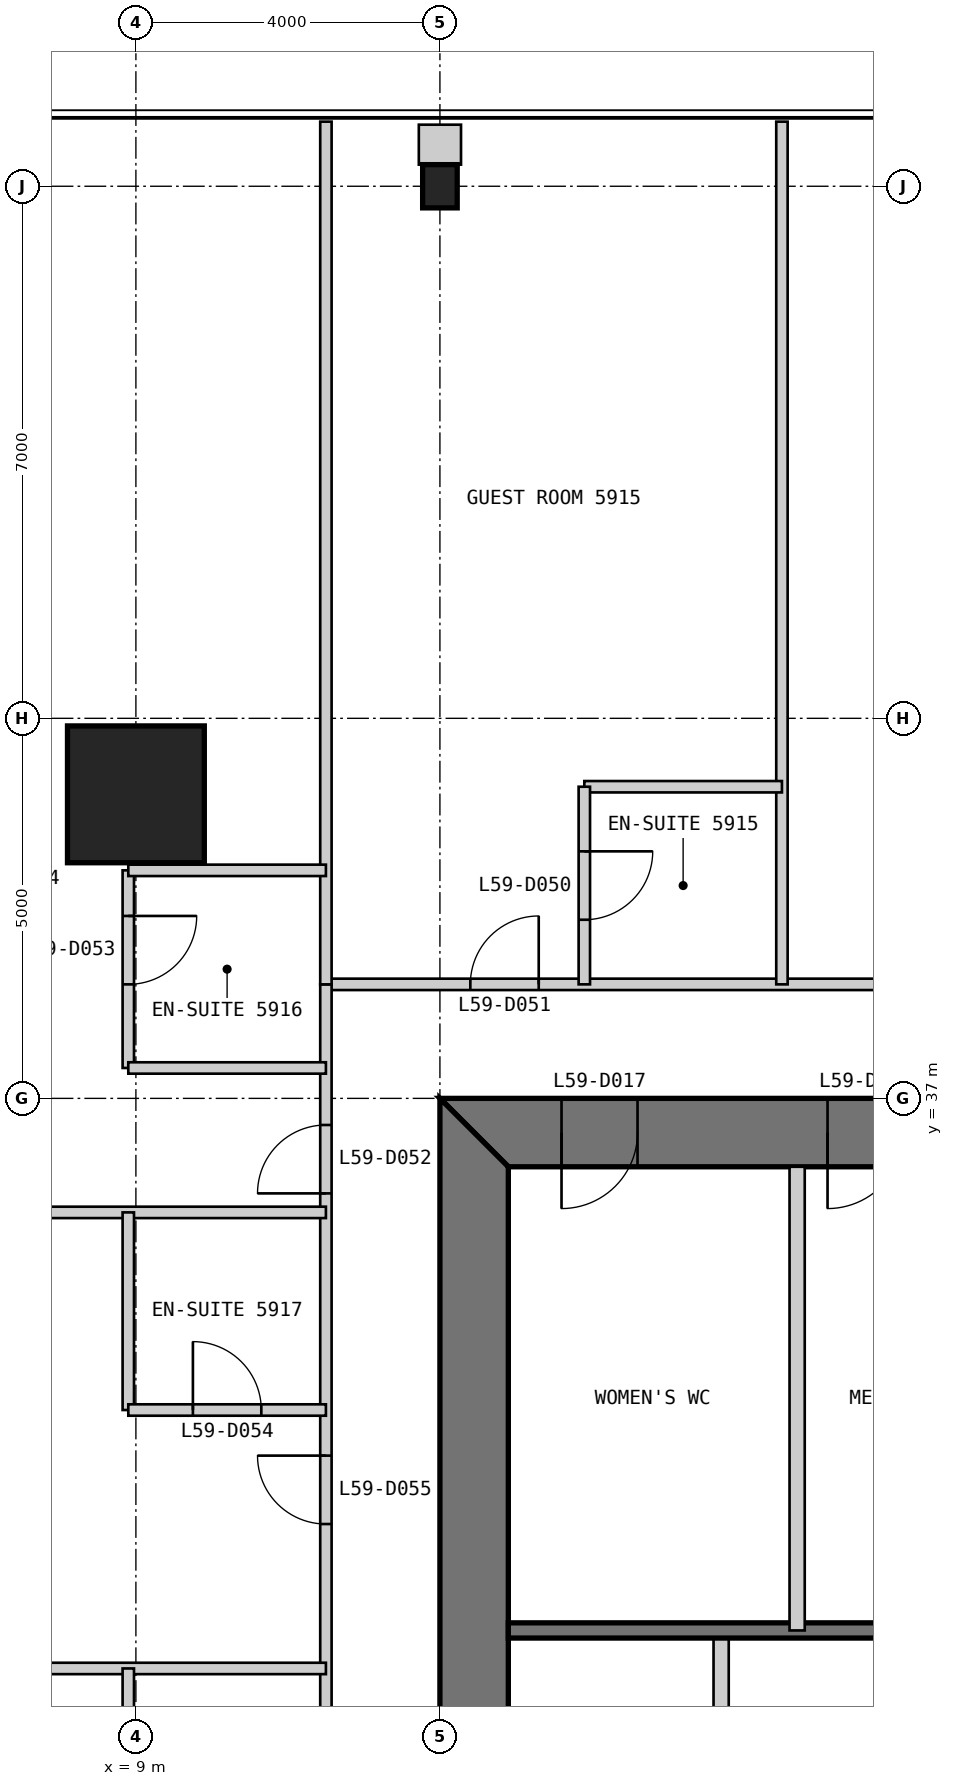
"""IFC4 building model, lengths in metres.
Left out: names, types, materials, properties, quantities, classifications, styles, units other than length and angle.
Written with IfcOpenShell. Run it as: python <this file> out.ifc"""

import sys

from ifc_helpers import new_model, si_unit, direction, frame, frame_2d, origin, origin_2d, place, context, subcontext, project, spatial, polyline, rectangle, i_section, outline, extrude, element, fill, save


model = new_model("IFC4")
c1 = context("Model", 3, precision=1e-05, world=origin(), true_north=direction((0.0, 1.0)))
c2 = subcontext(c1, "Body", "Model", "MODEL_VIEW")
j1 = project(units=[si_unit("LENGTHUNIT", "METRE"), si_unit("PLANEANGLEUNIT", "RADIAN")], contexts=[c1])
p1 = place(None, origin())
s1 = spatial("IfcSite", under=j1, at=p1, CompositionType="ELEMENT")
p2 = place(p1, origin())
s2 = spatial("IfcBuilding", under=s1, at=p2, CompositionType="ELEMENT")
p3 = place(p2, frame((0.0, 0.0, 252.6)))
s3 = spatial("IfcBuildingStorey", under=s2, at=p3, CompositionType="ELEMENT", Elevation=252.6)
p4 = place(p3, frame((9.0, 41.0, 0.0), z_axis=(0.0, 0.0, 1.0), x_axis=(1.0, 0.0, 0.0)))
e1 = element("IfcColumn", 1, at=p4, inside=s3, PredefinedType="COLUMN", context=c2, shape_type="SweptSolid", body=[
    extrude(rectangle(XDim=1.8, YDim=1.8, at=origin_2d()), origin(), (0.0, 0.0, 1.0), 3.4),
])
p5 = place(p3, frame((13.0, 49.0, 0.0), z_axis=(0.0, 0.0, 1.0), x_axis=(1.0, 0.0, 0.0)))
e2 = element("IfcColumn", 2, at=p5, inside=s3, PredefinedType="COLUMN", context=c2, shape_type="SweptSolid", body=[
    extrude(i_section(OverallWidth=0.455, OverallDepth=0.569, WebThickness=0.078, FlangeThickness=0.125, at=origin_2d()), origin(), (0.0, 0.0, 1.0), 3.4),
])
p6 = place(p3, frame((37.0, 36.55, 0.0), z_axis=(0.0, 0.0, 1.0), x_axis=(-1.0, 0.0, 0.0)))
e3 = element("IfcWall", 3, at=p6, inside=s3, PredefinedType="SHEAR", context=c2, shape_type="SweptSolid", body=[
    extrude(outline(polyline([(0.0, -0.45), (24.0, -0.45), (23.1, 0.45), (0.9, 0.45), (0.0, -0.45)])), origin(), (0.0, 0.0, 1.0), 3.4),
])
p7 = place(p6, frame((4.9, 0.0, 0.0)))
e4 = element("IfcOpeningElement", 4, at=p7, cuts=e3, PredefinedType="OPENING", context=c2, shape_type="SweptSolid", body=[
    extrude(rectangle(XDim=1.0, YDim=2.2, at=frame_2d((0.5, 1.1))), frame((0.0, 0.46, 0.0), z_axis=(0.0, -1.0, 0.0), x_axis=(1.0, 0.0, 0.0)), (0.0, 0.0, 1.0), 0.92),
])
p8 = place(p6, frame((8.9, 0.0, 0.0)))
e5 = element("IfcOpeningElement", 5, at=p8, cuts=e3, PredefinedType="OPENING", context=c2, shape_type="SweptSolid", body=[
    extrude(rectangle(XDim=1.1, YDim=2.2, at=frame_2d((0.55, 1.1))), frame((0.0, 0.46, 0.0), z_axis=(0.0, -1.0, 0.0), x_axis=(1.0, 0.0, 0.0)), (0.0, 0.0, 1.0), 0.92),
])
p9 = place(p6, frame((15.05, 0.0, 0.0)))
e6 = element("IfcOpeningElement", 6, at=p9, cuts=e3, PredefinedType="OPENING", context=c2, shape_type="SweptSolid", body=[
    extrude(rectangle(XDim=0.9, YDim=2.2, at=frame_2d((0.45, 1.1))), frame((0.0, 0.46, 0.0), z_axis=(0.0, -1.0, 0.0), x_axis=(1.0, 0.0, 0.0)), (0.0, 0.0, 1.0), 0.92),
])
p10 = place(p6, frame((17.9, 0.0, 0.0)))
e7 = element("IfcOpeningElement", 7, at=p10, cuts=e3, PredefinedType="OPENING", context=c2, shape_type="SweptSolid", body=[
    extrude(rectangle(XDim=1.0, YDim=2.2, at=frame_2d((0.5, 1.1))), frame((0.0, 0.46, 0.0), z_axis=(0.0, -1.0, 0.0), x_axis=(1.0, 0.0, 0.0)), (0.0, 0.0, 1.0), 0.92),
])
p11 = place(p6, frame((21.4, 0.0, 0.0)))
e8 = element("IfcOpeningElement", 8, at=p11, cuts=e3, PredefinedType="OPENING", context=c2, shape_type="SweptSolid", body=[
    extrude(rectangle(XDim=1.0, YDim=2.2, at=frame_2d((0.5, 1.1))), frame((0.0, 0.46, 0.0), z_axis=(0.0, -1.0, 0.0), x_axis=(1.0, 0.0, 0.0)), (0.0, 0.0, 1.0), 0.92),
])
p12 = place(p3, frame((13.45, 36.1, 0.0), z_axis=(0.0, 0.0, 1.0), x_axis=(0.0, -1.0, 0.0)))
e9 = element("IfcWall", 9, at=p12, inside=s3, PredefinedType="SHEAR", context=c2, shape_type="SweptSolid", body=[
    extrude(outline(polyline([(-0.9, -0.45), (23.1, -0.45), (22.2, 0.45), (0.0, 0.45), (-0.9, -0.45)])), origin(), (0.0, 0.0, 1.0), 3.4),
])
p13 = place(p12, frame((20.2, 0.0, 0.0)))
e10 = element("IfcOpeningElement", 10, at=p13, cuts=e9, PredefinedType="OPENING", context=c2, shape_type="SweptSolid", body=[
    extrude(rectangle(XDim=1.0, YDim=2.2, at=frame_2d((0.5, 1.1))), frame((0.0, 0.46, 0.0), z_axis=(0.0, -1.0, 0.0), x_axis=(1.0, 0.0, 0.0)), (0.0, 0.0, 1.0), 0.92),
])
p14 = place(p12, frame((17.25, 0.0, 0.0)))
e11 = element("IfcOpeningElement", 11, at=p14, cuts=e9, PredefinedType="OPENING", context=c2, shape_type="SweptSolid", body=[
    extrude(rectangle(XDim=0.9, YDim=2.2, at=frame_2d((0.45, 1.1))), frame((0.0, 0.46, 0.0), z_axis=(0.0, -1.0, 0.0), x_axis=(1.0, 0.0, 0.0)), (0.0, 0.0, 1.0), 0.92),
])
p15 = place(p3, frame((16.7, 13.9, 0.0), z_axis=(0.0, 0.0, 1.0), x_axis=(0.0, 1.0, 0.0)))
e12 = element("IfcWall", 12, at=p15, inside=s3, PredefinedType="PARTITIONING", context=c2, shape_type="SweptSolid", body=[
    extrude(rectangle(XDim=16.1, YDim=0.2, at=frame_2d((8.05, 0.0))), origin(), (0.0, 0.0, 1.0), 3.2),
])
p16 = place(p15, frame((13.4, 0.0, 0.0)))
e13 = element("IfcOpeningElement", 13, at=p16, cuts=e12, PredefinedType="OPENING", context=c2, shape_type="SweptSolid", body=[
    extrude(rectangle(XDim=0.9, YDim=2.2, at=frame_2d((0.45, 1.1))), frame((0.0, 0.11, 0.0), z_axis=(0.0, -1.0, 0.0), x_axis=(1.0, 0.0, 0.0)), (0.0, 0.0, 1.0), 0.22),
])
p17 = place(p3, frame((29.7, 30.0, 0.0), z_axis=(0.0, 0.0, 1.0), x_axis=(-1.0, 0.0, 0.0)))
e14 = element("IfcWall", 14, at=p17, inside=s3, PredefinedType="SOLIDWALL", context=c2, shape_type="SweptSolid", body=[
    extrude(rectangle(XDim=15.8, YDim=0.2, at=frame_2d((7.9, 0.0))), origin(), (0.0, 0.0, 1.0), 3.2),
])
p18 = place(p3, frame((17.7, 36.1, 0.0), z_axis=(0.0, 0.0, 1.0), x_axis=(0.0, -1.0, 0.0)))
e15 = element("IfcWall", 15, at=p18, inside=s3, PredefinedType="PARTITIONING", context=c2, shape_type="SweptSolid", body=[
    extrude(rectangle(XDim=6.1, YDim=0.2, at=frame_2d((3.05, 0.0))), origin(), (0.0, 0.0, 1.0), 3.2),
])
p19 = place(p3, frame((38.5, 38.5, 0.0), z_axis=(0.0, 0.0, 1.0), x_axis=(-1.0, 0.0, 0.0)))
e16 = element("IfcWall", 16, at=p19, inside=s3, PredefinedType="PARTITIONING", context=c2, shape_type="SweptSolid", body=[
    extrude(rectangle(XDim=27.0, YDim=0.15, at=frame_2d((13.5, 0.0))), origin(), (0.0, 0.0, 1.0), 3.25),
])
p20 = place(p19, frame((1.85, 0.0, 0.0)))
e17 = element("IfcOpeningElement", 17, at=p20, cuts=e16, PredefinedType="OPENING", context=c2, shape_type="SweptSolid", body=[
    extrude(rectangle(XDim=0.9, YDim=2.1, at=frame_2d((0.45, 1.05))), frame((0.0, 0.085, 0.0), z_axis=(0.0, -1.0, 0.0), x_axis=(1.0, 0.0, 0.0)), (0.0, 0.0, 1.0), 0.17),
])
p21 = place(p19, frame((6.2, 0.0, 0.0)))
e18 = element("IfcOpeningElement", 18, at=p21, cuts=e16, PredefinedType="OPENING", context=c2, shape_type="SweptSolid", body=[
    extrude(rectangle(XDim=0.9, YDim=2.1, at=frame_2d((0.45, 1.05))), frame((0.0, 0.085, 0.0), z_axis=(0.0, -1.0, 0.0), x_axis=(1.0, 0.0, 0.0)), (0.0, 0.0, 1.0), 0.17),
])
p22 = place(p19, frame((12.8, 0.0, 0.0)))
e19 = element("IfcOpeningElement", 19, at=p22, cuts=e16, PredefinedType="OPENING", context=c2, shape_type="SweptSolid", body=[
    extrude(rectangle(XDim=1.0, YDim=2.1, at=frame_2d((0.5, 1.05))), frame((0.0, 0.085, 0.0), z_axis=(0.0, -1.0, 0.0), x_axis=(1.0, 0.0, 0.0)), (0.0, 0.0, 1.0), 0.17),
])
p23 = place(p19, frame((18.2, 0.0, 0.0)))
e20 = element("IfcOpeningElement", 20, at=p23, cuts=e16, PredefinedType="OPENING", context=c2, shape_type="SweptSolid", body=[
    extrude(rectangle(XDim=0.9, YDim=2.1, at=frame_2d((0.45, 1.05))), frame((0.0, 0.085, 0.0), z_axis=(0.0, -1.0, 0.0), x_axis=(1.0, 0.0, 0.0)), (0.0, 0.0, 1.0), 0.17),
])
p24 = place(p19, frame((24.2, 0.0, 0.0)))
e21 = element("IfcOpeningElement", 21, at=p24, cuts=e16, PredefinedType="OPENING", context=c2, shape_type="SweptSolid", body=[
    extrude(rectangle(XDim=0.9, YDim=2.1, at=frame_2d((0.45, 1.05))), frame((0.0, 0.085, 0.0), z_axis=(0.0, -1.0, 0.0), x_axis=(1.0, 0.0, 0.0)), (0.0, 0.0, 1.0), 0.17),
])
p25 = place(p3, frame((17.5, 49.85, 0.0), z_axis=(0.0, 0.0, 1.0), x_axis=(0.0, -1.0, 0.0)))
e22 = element("IfcWall", 22, at=p25, inside=s3, PredefinedType="PARTITIONING", context=c2, shape_type="SweptSolid", body=[
    extrude(rectangle(XDim=11.35, YDim=0.15, at=frame_2d((5.675, 0.0))), origin(), (0.0, 0.0, 1.0), 3.25),
])
p26 = place(p3, frame((17.5, 41.1, 0.0), z_axis=(0.0, 0.0, 1.0), x_axis=(-1.0, 0.0, 0.0)))
e23 = element("IfcWall", 23, at=p26, inside=s3, PredefinedType="PARTITIONING", context=c2, shape_type="SweptSolid", body=[
    extrude(rectangle(XDim=2.6, YDim=0.15, at=frame_2d((1.3, 0.0))), origin(), (0.0, 0.0, 1.0), 3.25),
])
p27 = place(p3, frame((14.9, 41.1, 0.0), z_axis=(0.0, 0.0, 1.0), x_axis=(0.0, -1.0, 0.0)))
e24 = element("IfcWall", 24, at=p27, inside=s3, PredefinedType="PARTITIONING", context=c2, shape_type="SweptSolid", body=[
    extrude(rectangle(XDim=2.6, YDim=0.15, at=frame_2d((1.3, 0.0))), origin(), (0.0, 0.0, 1.0), 3.25),
])
p28 = place(p27, frame((0.85, 0.0, 0.0)))
e25 = element("IfcOpeningElement", 25, at=p28, cuts=e24, PredefinedType="OPENING", context=c2, shape_type="SweptSolid", body=[
    extrude(rectangle(XDim=0.9, YDim=2.1, at=frame_2d((0.45, 1.05))), frame((0.0, 0.085, 0.0), z_axis=(0.0, -1.0, 0.0), x_axis=(1.0, 0.0, 0.0)), (0.0, 0.0, 1.0), 0.17),
])
p29 = place(p3, frame((11.5, 38.5, 0.0), z_axis=(0.0, 0.0, 1.0), x_axis=(0.0, -1.0, 0.0)))
e26 = element("IfcWall", 26, at=p29, inside=s3, PredefinedType="PARTITIONING", context=c2, shape_type="SweptSolid", body=[
    extrude(rectangle(XDim=27.0, YDim=0.15, at=frame_2d((13.5, 0.0))), origin(), (0.0, 0.0, 1.0), 3.25),
])
p30 = place(p29, frame((1.85, 0.0, 0.0)))
e27 = element("IfcOpeningElement", 27, at=p30, cuts=e26, PredefinedType="OPENING", context=c2, shape_type="SweptSolid", body=[
    extrude(rectangle(XDim=0.9, YDim=2.1, at=frame_2d((0.45, 1.05))), frame((0.0, 0.085, 0.0), z_axis=(0.0, -1.0, 0.0), x_axis=(1.0, 0.0, 0.0)), (0.0, 0.0, 1.0), 0.17),
])
p31 = place(p29, frame((6.2, 0.0, 0.0)))
e28 = element("IfcOpeningElement", 28, at=p31, cuts=e26, PredefinedType="OPENING", context=c2, shape_type="SweptSolid", body=[
    extrude(rectangle(XDim=0.9, YDim=2.1, at=frame_2d((0.45, 1.05))), frame((0.0, 0.085, 0.0), z_axis=(0.0, -1.0, 0.0), x_axis=(1.0, 0.0, 0.0)), (0.0, 0.0, 1.0), 0.17),
])
p32 = place(p29, frame((12.2, 0.0, 0.0)))
e29 = element("IfcOpeningElement", 29, at=p32, cuts=e26, PredefinedType="OPENING", context=c2, shape_type="SweptSolid", body=[
    extrude(rectangle(XDim=0.9, YDim=2.1, at=frame_2d((0.45, 1.05))), frame((0.0, 0.085, 0.0), z_axis=(0.0, -1.0, 0.0), x_axis=(1.0, 0.0, 0.0)), (0.0, 0.0, 1.0), 0.17),
])
p33 = place(p29, frame((18.2, 0.0, 0.0)))
e30 = element("IfcOpeningElement", 30, at=p33, cuts=e26, PredefinedType="OPENING", context=c2, shape_type="SweptSolid", body=[
    extrude(rectangle(XDim=0.9, YDim=2.1, at=frame_2d((0.45, 1.05))), frame((0.0, 0.085, 0.0), z_axis=(0.0, -1.0, 0.0), x_axis=(1.0, 0.0, 0.0)), (0.0, 0.0, 1.0), 0.17),
])
p34 = place(p29, frame((24.2, 0.0, 0.0)))
e31 = element("IfcOpeningElement", 31, at=p34, cuts=e26, PredefinedType="OPENING", context=c2, shape_type="SweptSolid", body=[
    extrude(rectangle(XDim=0.9, YDim=2.1, at=frame_2d((0.45, 1.05))), frame((0.0, 0.085, 0.0), z_axis=(0.0, -1.0, 0.0), x_axis=(1.0, 0.0, 0.0)), (0.0, 0.0, 1.0), 0.17),
])
p35 = place(p3, frame((11.5, 49.85, 0.0), z_axis=(0.0, 0.0, 1.0), x_axis=(0.0, -1.0, 0.0)))
e32 = element("IfcWall", 32, at=p35, inside=s3, PredefinedType="PARTITIONING", context=c2, shape_type="SweptSolid", body=[
    extrude(rectangle(XDim=11.35, YDim=0.15, at=frame_2d((5.675, 0.0))), origin(), (0.0, 0.0, 1.0), 3.25),
])
p36 = place(p3, frame((8.9, 40.0, 0.0), z_axis=(0.0, 0.0, 1.0), x_axis=(0.0, -1.0, 0.0)))
e33 = element("IfcWall", 33, at=p36, inside=s3, PredefinedType="PARTITIONING", context=c2, shape_type="SweptSolid", body=[
    extrude(rectangle(XDim=2.6, YDim=0.15, at=frame_2d((1.3, 0.0))), origin(), (0.0, 0.0, 1.0), 2.638),
])
p37 = place(p36, frame((0.6, 0.0, 0.0)))
e34 = element("IfcOpeningElement", 34, at=p37, cuts=e33, PredefinedType="OPENING", context=c2, shape_type="SweptSolid", body=[
    extrude(rectangle(XDim=0.9, YDim=2.1, at=frame_2d((0.45, 1.05))), frame((0.0, 0.085, 0.0), z_axis=(0.0, -1.0, 0.0), x_axis=(1.0, 0.0, 0.0)), (0.0, 0.0, 1.0), 0.17),
])
for number, where, z_axis, x_axis in (
    (35, (8.9, 40.0, 0.0), (0.0, 0.0, 1.0), (1.0, 0.0, 0.0)),
    (36, (8.9, 37.4, 0.0), (0.0, 0.0, 1.0), (1.0, 0.0, 0.0)),
):
    element("IfcWall", number, at=place(p3, frame(where, z_axis=z_axis, x_axis=x_axis)), inside=s3, PredefinedType="PARTITIONING", context=c2, shape_type="SweptSolid", body=[
        extrude(rectangle(XDim=2.6, YDim=0.15, at=frame_2d((1.3, 0.0))), origin(), (0.0, 0.0, 1.0), 3.25),
    ])
p38 = place(p3, frame((0.15, 35.5, 0.0), z_axis=(0.0, 0.0, 1.0), x_axis=(1.0, 0.0, 0.0)))
e37 = element("IfcWall", 37, at=p38, inside=s3, PredefinedType="PARTITIONING", context=c2, shape_type="SweptSolid", body=[
    extrude(rectangle(XDim=11.35, YDim=0.15, at=frame_2d((5.675, 0.0))), origin(), (0.0, 0.0, 1.0), 3.25),
])
p39 = place(p3, frame((8.9, 35.5, 0.0), z_axis=(0.0, 0.0, 1.0), x_axis=(0.0, -1.0, 0.0)))
e38 = element("IfcWall", 38, at=p39, inside=s3, PredefinedType="PARTITIONING", context=c2, shape_type="SweptSolid", body=[
    extrude(rectangle(XDim=2.6, YDim=0.15, at=frame_2d((1.3, 0.0))), origin(), (0.0, 0.0, 1.0), 3.25),
])
p40 = place(p3, frame((8.9, 32.9, 0.0), z_axis=(0.0, 0.0, 1.0), x_axis=(1.0, 0.0, 0.0)))
e39 = element("IfcWall", 39, at=p40, inside=s3, PredefinedType="PARTITIONING", context=c2, shape_type="SweptSolid", body=[
    extrude(rectangle(XDim=2.6, YDim=0.15, at=frame_2d((1.3, 0.0))), origin(), (0.0, 0.0, 1.0), 3.25),
])
p41 = place(p40, frame((0.85, 0.0, 0.0)))
e40 = element("IfcOpeningElement", 40, at=p41, cuts=e39, PredefinedType="OPENING", context=c2, shape_type="SweptSolid", body=[
    extrude(rectangle(XDim=0.9, YDim=2.1, at=frame_2d((0.45, 1.05))), frame((0.0, 0.085, 0.0), z_axis=(0.0, -1.0, 0.0), x_axis=(1.0, 0.0, 0.0)), (0.0, 0.0, 1.0), 0.17),
])
p42 = place(p3, frame((0.15, 29.5, 0.0), z_axis=(0.0, 0.0, 1.0), x_axis=(1.0, 0.0, 0.0)))
e41 = element("IfcWall", 41, at=p42, inside=s3, PredefinedType="PARTITIONING", context=c2, shape_type="SweptSolid", body=[
    extrude(rectangle(XDim=11.35, YDim=0.15, at=frame_2d((5.675, 0.0))), origin(), (0.0, 0.0, 1.0), 3.25),
])
p43 = place(p3, frame((8.9, 29.5, 0.0), z_axis=(0.0, 0.0, 1.0), x_axis=(0.0, -1.0, 0.0)))
e42 = element("IfcWall", 42, at=p43, inside=s3, PredefinedType="PARTITIONING", context=c2, shape_type="SweptSolid", body=[
    extrude(rectangle(XDim=2.6, YDim=0.15, at=frame_2d((1.3, 0.0))), origin(), (0.0, 0.0, 1.0), 3.25),
])
p44 = place(p3, frame((13.0, 49.81, 0.0), z_axis=(0.0, 0.0, 1.0), x_axis=(0.0, -1.0, 0.0)))
e43 = element("IfcWall", 43, at=p44, inside=s3, PredefinedType="PARTITIONING", context=c2, shape_type="SweptSolid", body=[
    extrude(rectangle(XDim=0.526, YDim=0.555, at=frame_2d((0.263, 0.0))), origin(), (0.0, 0.0, 1.0), 3.25),
])
p45 = place(p10, origin())
e44 = element("IfcDoor", 44, at=p45, inside=s3, OperationType="SINGLE_SWING_RIGHT", PredefinedType="DOOR", context=c2, shape_type="SweptSolid", body=[
    extrude(rectangle(XDim=1.0, YDim=2.2, at=frame_2d((0.5, 1.1))), frame((0.0, 0.025, 0.0), z_axis=(0.0, -1.0, 0.0), x_axis=(1.0, 0.0, 0.0)), (0.0, 0.0, 1.0), 0.05),
    extrude(outline(polyline([(0.0, 0.0), (0.04, 0.0), (0.04, 2.16), (0.96, 2.16), (0.96, 0.0), (1.0, 0.0), (1.0, 2.2), (0.0, 2.2), (0.0, 0.0)])), frame((0.0, 0.3, 0.0), z_axis=(0.0, -1.0, 0.0), x_axis=(1.0, 0.0, 0.0)), (0.0, 0.0, 1.0), 0.6),
])
fill(e7, e44)
p46 = place(p11, origin())
e45 = element("IfcDoor", 45, at=p46, inside=s3, OperationType="SINGLE_SWING_RIGHT", PredefinedType="DOOR", context=c2, shape_type="SweptSolid", body=[
    extrude(rectangle(XDim=1.0, YDim=2.2, at=frame_2d((0.5, 1.1))), frame((0.0, 0.025, 0.0), z_axis=(0.0, -1.0, 0.0), x_axis=(1.0, 0.0, 0.0)), (0.0, 0.0, 1.0), 0.05),
    extrude(outline(polyline([(0.0, 0.0), (0.04, 0.0), (0.04, 2.16), (0.96, 2.16), (0.96, 0.0), (1.0, 0.0), (1.0, 2.2), (0.0, 2.2), (0.0, 0.0)])), frame((0.0, 0.3, 0.0), z_axis=(0.0, -1.0, 0.0), x_axis=(1.0, 0.0, 0.0)), (0.0, 0.0, 1.0), 0.6),
])
fill(e8, e45)
p47 = place(p28, origin())
e46 = element("IfcDoor", 46, at=p47, inside=s3, OperationType="SINGLE_SWING_LEFT", PredefinedType="DOOR", context=c2, shape_type="SweptSolid", body=[
    extrude(rectangle(XDim=0.9, YDim=2.1, at=frame_2d((0.45, 1.05))), frame((0.0, 0.025, 0.0), z_axis=(0.0, -1.0, 0.0), x_axis=(1.0, 0.0, 0.0)), (0.0, 0.0, 1.0), 0.05),
])
fill(e25, e46)
p48 = place(p24, frame((0.9, 0.0, 0.0), z_axis=(0.0, 0.0, 1.0), x_axis=(-1.0, 0.0, 0.0)))
e47 = element("IfcDoor", 47, at=p48, inside=s3, OperationType="SINGLE_SWING_RIGHT", PredefinedType="DOOR", context=c2, shape_type="SweptSolid", body=[
    extrude(rectangle(XDim=0.9, YDim=2.1, at=frame_2d((0.45, 1.05))), frame((0.0, 0.025, 0.0), z_axis=(0.0, -1.0, 0.0), x_axis=(1.0, 0.0, 0.0)), (0.0, 0.0, 1.0), 0.05),
])
fill(e21, e47)
p49 = place(p30, frame((0.9, 0.0, 0.0), z_axis=(0.0, 0.0, 1.0), x_axis=(-1.0, 0.0, 0.0)))
e48 = element("IfcDoor", 48, at=p49, inside=s3, OperationType="SINGLE_SWING_LEFT", PredefinedType="DOOR", context=c2, shape_type="SweptSolid", body=[
    extrude(rectangle(XDim=0.9, YDim=2.1, at=frame_2d((0.45, 1.05))), frame((0.0, 0.025, 0.0), z_axis=(0.0, -1.0, 0.0), x_axis=(1.0, 0.0, 0.0)), (0.0, 0.0, 1.0), 0.05),
])
fill(e27, e48)
p50 = place(p37, origin())
e49 = element("IfcDoor", 49, at=p50, inside=s3, OperationType="SINGLE_SWING_LEFT", PredefinedType="DOOR", context=c2, shape_type="SweptSolid", body=[
    extrude(rectangle(XDim=0.9, YDim=2.1, at=frame_2d((0.45, 1.05))), frame((0.0, 0.025, 0.0), z_axis=(0.0, -1.0, 0.0), x_axis=(1.0, 0.0, 0.0)), (0.0, 0.0, 1.0), 0.05),
])
fill(e34, e49)
p51 = place(p41, origin())
e50 = element("IfcDoor", 50, at=p51, inside=s3, OperationType="SINGLE_SWING_LEFT", PredefinedType="DOOR", context=c2, shape_type="SweptSolid", body=[
    extrude(rectangle(XDim=0.9, YDim=2.1, at=frame_2d((0.45, 1.05))), frame((0.0, 0.025, 0.0), z_axis=(0.0, -1.0, 0.0), x_axis=(1.0, 0.0, 0.0)), (0.0, 0.0, 1.0), 0.05),
])
fill(e40, e50)
p52 = place(p31, frame((0.9, 0.0, 0.0), z_axis=(0.0, 0.0, 1.0), x_axis=(-1.0, 0.0, 0.0)))
e51 = element("IfcDoor", 51, at=p52, inside=s3, OperationType="SINGLE_SWING_RIGHT", PredefinedType="DOOR", context=c2, shape_type="SweptSolid", body=[
    extrude(rectangle(XDim=0.9, YDim=2.1, at=frame_2d((0.45, 1.05))), frame((0.0, 0.025, 0.0), z_axis=(0.0, -1.0, 0.0), x_axis=(1.0, 0.0, 0.0)), (0.0, 0.0, 1.0), 0.05),
])
fill(e28, e51)
save(model, sys.argv[1])
